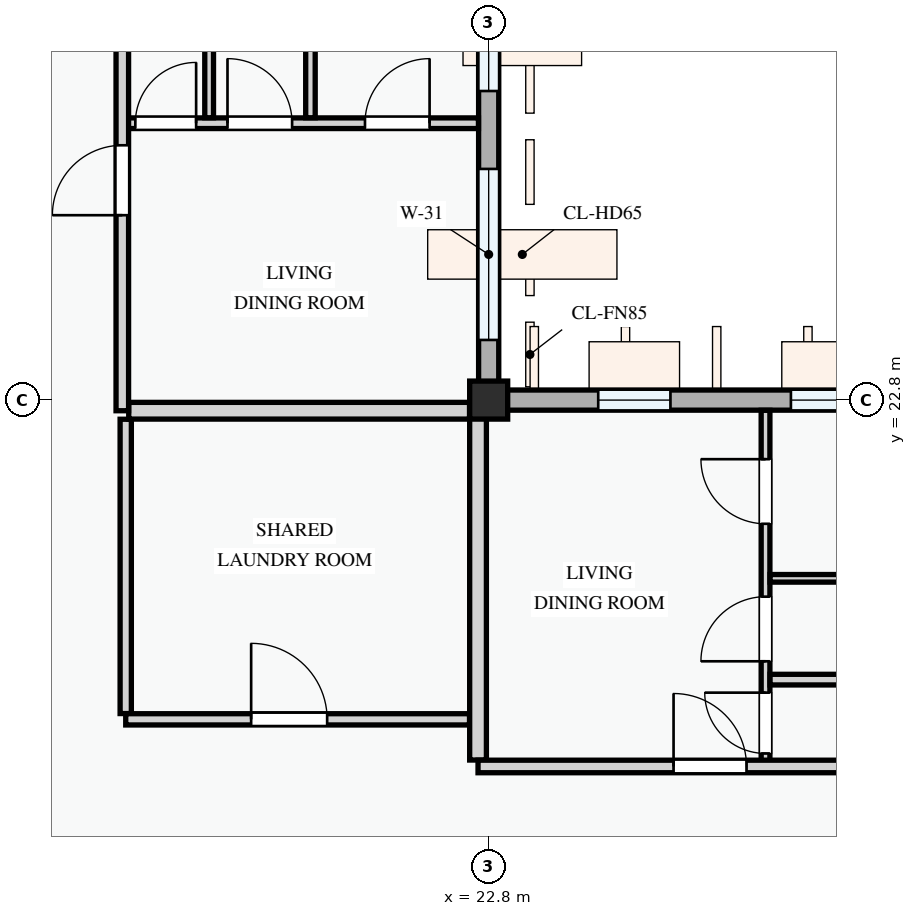
"""IFC4 building model, lengths in metres.
Left out: names, types, materials, properties, quantities, classifications, styles, units other than length and angle.
Written with IfcOpenShell. Run it as: python <this file> out.ifc"""

import sys

from ifc_helpers import new_model, si_unit, direction, frame, frame_2d, origin, origin_2d, place, context, subcontext, project, spatial, rectangle, extrude, element, fill, save


model = new_model("IFC4")
c1 = context("Model", 3, precision=1e-05, world=origin(), true_north=direction((0.0, 1.0)))
c2 = subcontext(c1, "Body", "Model", "MODEL_VIEW")
j1 = project(units=[si_unit("LENGTHUNIT", "METRE"), si_unit("PLANEANGLEUNIT", "RADIAN")], contexts=[c1])
p1 = place(None, origin())
s1 = spatial("IfcSite", under=j1, at=p1, CompositionType="ELEMENT")
p2 = place(p1, origin())
s2 = spatial("IfcBuilding", under=s1, at=p2, CompositionType="ELEMENT")
p3 = place(p2, frame((0.0, 0.0, 27.9)))
s3 = spatial("IfcBuildingStorey", under=s2, at=p3, CompositionType="ELEMENT", Elevation=27.9)
p4 = place(p3, frame((22.8, 22.8, 0.0), z_axis=(0.0, 0.0, 1.0), x_axis=(1.0, 0.0, 0.0)))
e1 = element("IfcColumn", 1, at=p4, inside=s3, PredefinedType="COLUMN", context=c2, shape_type="SweptSolid", body=[
    extrude(rectangle(XDim=0.5, YDim=0.5, at=origin_2d()), origin(), (0.0, 0.0, 1.0), 3.3),
])
p5 = place(p3, frame((22.8, 22.8, 0.0), z_axis=(0.0, 0.0, 1.0), x_axis=(0.0, 1.0, 0.0)))
e2 = element("IfcWall", 2, at=p5, inside=s3, PredefinedType="STANDARD", context=c2, shape_type="SweptSolid", body=[
    extrude(rectangle(XDim=6.0, YDim=0.265, at=frame_2d((3.0, 0.0))), origin(), (0.0, 0.0, 1.0), 2.575),
])
p6 = place(p5, frame((0.791, 0.0, 0.78)))
e3 = element("IfcOpeningElement", 3, at=p6, cuts=e2, PredefinedType="OPENING", context=c2, shape_type="SweptSolid", body=[
    extrude(rectangle(XDim=2.25, YDim=1.6, at=frame_2d((1.125, 0.8))), frame((0.0, 0.143, 0.0), z_axis=(0.0, -1.0, 0.0), x_axis=(1.0, 0.0, 0.0)), (0.0, 0.0, 1.0), 0.285),
])
p7 = place(p5, frame((4.066, 0.0, 0.78)))
e4 = element("IfcOpeningElement", 4, at=p7, cuts=e2, PredefinedType="OPENING", context=c2, shape_type="SweptSolid", body=[
    extrude(rectangle(XDim=1.32, YDim=1.35, at=frame_2d((0.66, 0.675))), frame((0.0, 0.143, 0.0), z_axis=(0.0, -1.0, 0.0), x_axis=(1.0, 0.0, 0.0)), (0.0, 0.0, 1.0), 0.285),
])
p8 = place(p3, frame((28.8, 22.8, 0.0), z_axis=(0.0, 0.0, 1.0), x_axis=(-1.0, 0.0, 0.0)))
e5 = element("IfcWall", 5, at=p8, inside=s3, PredefinedType="STANDARD", context=c2, shape_type="SweptSolid", body=[
    extrude(rectangle(XDim=6.0, YDim=0.265, at=frame_2d((3.0, 0.0))), origin(), (0.0, 0.0, 1.0), 2.475),
])
p9 = place(p8, frame((0.524, 0.0, 0.78)))
e6 = element("IfcOpeningElement", 6, at=p9, cuts=e5, PredefinedType="OPENING", context=c2, shape_type="SweptSolid", body=[
    extrude(rectangle(XDim=1.5, YDim=1.5, at=frame_2d((0.75, 0.75))), frame((0.0, 0.143, 0.0), z_axis=(0.0, -1.0, 0.0), x_axis=(1.0, 0.0, 0.0)), (0.0, 0.0, 1.0), 0.285),
])
p10 = place(p8, frame((3.609, 0.0, 0.78)))
e7 = element("IfcOpeningElement", 7, at=p10, cuts=e5, PredefinedType="OPENING", context=c2, shape_type="SweptSolid", body=[
    extrude(rectangle(XDim=0.95, YDim=1.15, at=frame_2d((0.475, 0.575))), frame((0.0, 0.143, 0.0), z_axis=(0.0, -1.0, 0.0), x_axis=(1.0, 0.0, 0.0)), (0.0, 0.0, 1.0), 0.285),
])
p11 = place(p3, frame((18.025, 18.676, 0.0), z_axis=(0.0, 0.0, 1.0), x_axis=(0.0, 1.0, 0.0)))
e8 = element("IfcWall", 8, at=p11, inside=s3, PredefinedType="PARTITIONING", context=c2, shape_type="SweptSolid", body=[
    extrude(rectangle(XDim=3.872, YDim=0.148, at=frame_2d((1.936, 0.0))), origin(), (0.0, 0.0, 1.0), 3.0),
])
p12 = place(p3, frame((18.025, 18.6, 0.0), z_axis=(0.0, 0.0, 1.0), x_axis=(1.0, 0.0, 0.0)))
e9 = element("IfcWall", 9, at=p12, inside=s3, PredefinedType="PARTITIONING", context=c2, shape_type="SweptSolid", body=[
    extrude(rectangle(XDim=4.523, YDim=0.148, at=frame_2d((2.262, 0.0))), origin(), (0.0, 0.0, 1.0), 3.0),
])
p13 = place(p12, frame((1.65, 0.0, 0.0)))
e10 = element("IfcOpeningElement", 10, at=p13, cuts=e9, PredefinedType="OPENING", context=c2, shape_type="SweptSolid", body=[
    extrude(rectangle(XDim=1.0, YDim=2.15, at=frame_2d((0.5, 1.075))), frame((0.0, 0.084, 0.0), z_axis=(0.0, -1.0, 0.0), x_axis=(1.0, 0.0, 0.0)), (0.0, 0.0, 1.0), 0.168),
])
p14 = place(p3, frame((17.98, 26.442, 0.0), z_axis=(0.0, 0.0, 1.0), x_axis=(1.0, 0.0, 0.0)))
e11 = element("IfcWall", 11, at=p14, inside=s3, PredefinedType="PARTITIONING", context=c2, shape_type="SweptSolid", body=[
    extrude(rectangle(XDim=4.686, YDim=0.14, at=frame_2d((2.343, 0.0))), origin(), (0.0, 0.0, 1.0), 3.0),
])
p15 = place(p14, frame((0.171, 0.0, 0.0)))
e12 = element("IfcOpeningElement", 12, at=p15, cuts=e11, PredefinedType="OPENING", context=c2, shape_type="SweptSolid", body=[
    extrude(rectangle(XDim=0.8, YDim=2.1, at=frame_2d((0.4, 1.05))), frame((0.0, 0.08, 0.0), z_axis=(0.0, -1.0, 0.0), x_axis=(1.0, 0.0, 0.0)), (0.0, 0.0, 1.0), 0.16),
])
p16 = place(p14, frame((1.384, 0.0, 0.0)))
e13 = element("IfcOpeningElement", 13, at=p16, cuts=e11, PredefinedType="OPENING", context=c2, shape_type="SweptSolid", body=[
    extrude(rectangle(XDim=0.85, YDim=2.1, at=frame_2d((0.425, 1.05))), frame((0.0, 0.08, 0.0), z_axis=(0.0, -1.0, 0.0), x_axis=(1.0, 0.0, 0.0)), (0.0, 0.0, 1.0), 0.16),
])
p17 = place(p14, frame((3.193, 0.0, 0.0)))
e14 = element("IfcOpeningElement", 14, at=p17, cuts=e11, PredefinedType="OPENING", context=c2, shape_type="SweptSolid", body=[
    extrude(rectangle(XDim=0.85, YDim=2.1, at=frame_2d((0.425, 1.05))), frame((0.0, 0.08, 0.0), z_axis=(0.0, -1.0, 0.0), x_axis=(1.0, 0.0, 0.0)), (0.0, 0.0, 1.0), 0.16),
])
p18 = place(p3, frame((20.455, 26.514, 0.0), z_axis=(0.0, 0.0, 1.0), x_axis=(0.0, 1.0, 0.0)))
e15 = element("IfcWall", 15, at=p18, inside=s3, PredefinedType="PARTITIONING", context=c2, shape_type="SweptSolid", body=[
    extrude(rectangle(XDim=3.924, YDim=0.125, at=frame_2d((1.962, 0.0))), origin(), (0.0, 0.0, 1.0), 3.0),
])
p19 = place(p3, frame((19.122, 26.514, 0.0), z_axis=(0.0, 0.0, 1.0), x_axis=(0.0, 1.0, 0.0)))
e16 = element("IfcWall", 16, at=p19, inside=s3, PredefinedType="PARTITIONING", context=c2, shape_type="SweptSolid", body=[
    extrude(rectangle(XDim=3.924, YDim=0.115, at=frame_2d((1.962, 0.0))), origin(), (0.0, 0.0, 1.0), 3.0),
])
p20 = place(p3, frame((18.064, 22.66, 0.0), z_axis=(0.0, 0.0, 1.0), x_axis=(1.0, 0.0, 0.0)))
e17 = element("IfcWall", 17, at=p20, inside=s3, PredefinedType="PARTITIONING", context=c2, shape_type="SweptSolid", body=[
    extrude(rectangle(XDim=4.484, YDim=0.22, at=frame_2d((2.242, 0.0))), origin(), (0.0, 0.0, 1.0), 2.375),
])
p21 = place(p3, frame((17.98, 22.66, 0.0), z_axis=(0.0, 0.0, 1.0), x_axis=(0.0, 1.0, 0.0)))
e18 = element("IfcWall", 18, at=p21, inside=s3, PredefinedType="PARTITIONING", context=c2, shape_type="SweptSolid", body=[
    extrude(rectangle(XDim=20.406, YDim=0.165, at=frame_2d((10.203, 0.0))), origin(), (0.0, 0.0, 1.0), 3.0),
])
p22 = place(p21, frame((2.573, 0.0, 0.0)))
e19 = element("IfcOpeningElement", 19, at=p22, cuts=e18, PredefinedType="OPENING", context=c2, shape_type="SweptSolid", body=[
    extrude(rectangle(XDim=0.92, YDim=2.1, at=frame_2d((0.46, 1.05))), frame((0.0, 0.093, 0.0), z_axis=(0.0, -1.0, 0.0), x_axis=(1.0, 0.0, 0.0)), (0.0, 0.0, 1.0), 0.185),
])
p23 = place(p21, frame((9.824, 0.0, 0.0)))
e20 = element("IfcOpeningElement", 20, at=p23, cuts=e18, PredefinedType="OPENING", context=c2, shape_type="SweptSolid", body=[
    extrude(rectangle(XDim=0.96, YDim=2.12, at=frame_2d((0.48, 1.06))), frame((0.0, 0.093, 0.0), z_axis=(0.0, -1.0, 0.0), x_axis=(1.0, 0.0, 0.0)), (0.0, 0.0, 1.0), 0.185),
])
p24 = place(p3, frame((26.442, 17.98, 0.0), z_axis=(0.0, 0.0, 1.0), x_axis=(0.0, 1.0, 0.0)))
e21 = element("IfcWall", 21, at=p24, inside=s3, PredefinedType="PARTITIONING", context=c2, shape_type="SweptSolid", body=[
    extrude(rectangle(XDim=4.686, YDim=0.115, at=frame_2d((2.343, 0.0))), origin(), (0.0, 0.0, 1.0), 3.0),
])
p25 = place(p24, frame((0.171, 0.0, 0.0)))
e22 = element("IfcOpeningElement", 22, at=p25, cuts=e21, PredefinedType="OPENING", context=c2, shape_type="SweptSolid", body=[
    extrude(rectangle(XDim=0.8, YDim=2.1, at=frame_2d((0.4, 1.05))), frame((0.0, 0.067, 0.0), z_axis=(0.0, -1.0, 0.0), x_axis=(1.0, 0.0, 0.0)), (0.0, 0.0, 1.0), 0.135),
])
p26 = place(p24, frame((1.384, 0.0, 0.0)))
e23 = element("IfcOpeningElement", 23, at=p26, cuts=e21, PredefinedType="OPENING", context=c2, shape_type="SweptSolid", body=[
    extrude(rectangle(XDim=0.85, YDim=2.1, at=frame_2d((0.425, 1.05))), frame((0.0, 0.067, 0.0), z_axis=(0.0, -1.0, 0.0), x_axis=(1.0, 0.0, 0.0)), (0.0, 0.0, 1.0), 0.135),
])
p27 = place(p24, frame((3.193, 0.0, 0.0)))
e24 = element("IfcOpeningElement", 24, at=p27, cuts=e21, PredefinedType="OPENING", context=c2, shape_type="SweptSolid", body=[
    extrude(rectangle(XDim=0.85, YDim=2.1, at=frame_2d((0.425, 1.05))), frame((0.0, 0.067, 0.0), z_axis=(0.0, -1.0, 0.0), x_axis=(1.0, 0.0, 0.0)), (0.0, 0.0, 1.0), 0.135),
])
p28 = place(p3, frame((26.502, 20.455, 0.0), z_axis=(0.0, 0.0, 1.0), x_axis=(1.0, 0.0, 0.0)))
e25 = element("IfcWall", 25, at=p28, inside=s3, PredefinedType="PARTITIONING", context=c2, shape_type="SweptSolid", body=[
    extrude(rectangle(XDim=3.936, YDim=0.1, at=frame_2d((1.968, 0.0))), origin(), (0.0, 0.0, 1.0), 3.0),
])
p29 = place(p3, frame((26.502, 19.122, 0.0), z_axis=(0.0, 0.0, 1.0), x_axis=(1.0, 0.0, 0.0)))
e26 = element("IfcWall", 26, at=p29, inside=s3, PredefinedType="PARTITIONING", context=c2, shape_type="SweptSolid", body=[
    extrude(rectangle(XDim=3.936, YDim=0.14, at=frame_2d((1.968, 0.0))), origin(), (0.0, 0.0, 1.0), 3.0),
])
p30 = place(p3, frame((22.66, 18.064, 0.0), z_axis=(0.0, 0.0, 1.0), x_axis=(0.0, 1.0, 0.0)))
e27 = element("IfcWall", 27, at=p30, inside=s3, PredefinedType="PARTITIONING", context=c2, shape_type="SweptSolid", body=[
    extrude(rectangle(XDim=4.676, YDim=0.22, at=frame_2d((2.338, 0.0))), origin(), (0.0, 0.0, 1.0), 2.425),
])
p31 = place(p3, frame((22.66, 17.98, 0.0), z_axis=(0.0, 0.0, 1.0), x_axis=(1.0, 0.0, 0.0)))
e28 = element("IfcWall", 28, at=p31, inside=s3, PredefinedType="PARTITIONING", context=c2, shape_type="SweptSolid", body=[
    extrude(rectangle(XDim=20.406, YDim=0.165, at=frame_2d((10.203, 0.0))), origin(), (0.0, 0.0, 1.0), 3.0),
])
p32 = place(p31, frame((2.573, 0.0, 0.0)))
e29 = element("IfcOpeningElement", 29, at=p32, cuts=e28, PredefinedType="OPENING", context=c2, shape_type="SweptSolid", body=[
    extrude(rectangle(XDim=0.96, YDim=2.12, at=frame_2d((0.48, 1.06))), frame((0.0, 0.093, 0.0), z_axis=(0.0, -1.0, 0.0), x_axis=(1.0, 0.0, 0.0)), (0.0, 0.0, 1.0), 0.185),
])
p33 = place(p31, frame((9.824, 0.0, 0.0)))
e30 = element("IfcOpeningElement", 30, at=p33, cuts=e28, PredefinedType="OPENING", context=c2, shape_type="SweptSolid", body=[
    extrude(rectangle(XDim=0.92, YDim=2.1, at=frame_2d((0.46, 1.05))), frame((0.0, 0.093, 0.0), z_axis=(0.0, -1.0, 0.0), x_axis=(1.0, 0.0, 0.0)), (0.0, 0.0, 1.0), 0.185),
])
p34 = place(p6, origin())
e31 = element("IfcWindow", 31, at=p34, inside=s3, PartitioningType="DOUBLE_PANEL_VERTICAL", PredefinedType="WINDOW", context=c2, shape_type="SweptSolid", body=[
    extrude(rectangle(XDim=2.25, YDim=1.6, at=frame_2d((1.125, 0.8))), frame((0.0, 0.03, 0.0), z_axis=(0.0, -1.0, 0.0), x_axis=(1.0, 0.0, 0.0)), (0.0, 0.0, 1.0), 0.06),
])
fill(e3, e31)
p35 = place(p7, origin())
e32 = element("IfcWindow", 32, at=p35, inside=s3, PartitioningType="SINGLE_PANEL", PredefinedType="WINDOW", context=c2, shape_type="SweptSolid", body=[
    extrude(rectangle(XDim=1.32, YDim=1.35, at=frame_2d((0.66, 0.675))), frame((0.0, 0.03, 0.0), z_axis=(0.0, -1.0, 0.0), x_axis=(1.0, 0.0, 0.0)), (0.0, 0.0, 1.0), 0.06),
])
fill(e4, e32)
p36 = place(p9, origin())
e33 = element("IfcWindow", 33, at=p36, inside=s3, PartitioningType="SINGLE_PANEL", PredefinedType="WINDOW", context=c2, shape_type="SweptSolid", body=[
    extrude(rectangle(XDim=1.5, YDim=1.5, at=frame_2d((0.75, 0.75))), frame((0.0, 0.03, 0.0), z_axis=(0.0, -1.0, 0.0), x_axis=(1.0, 0.0, 0.0)), (0.0, 0.0, 1.0), 0.06),
])
fill(e6, e33)
p37 = place(p10, origin())
e34 = element("IfcWindow", 34, at=p37, inside=s3, PartitioningType="SINGLE_PANEL", PredefinedType="WINDOW", context=c2, shape_type="SweptSolid", body=[
    extrude(rectangle(XDim=0.95, YDim=1.15, at=frame_2d((0.475, 0.575))), frame((0.0, 0.03, 0.0), z_axis=(0.0, -1.0, 0.0), x_axis=(1.0, 0.0, 0.0)), (0.0, 0.0, 1.0), 0.06),
])
fill(e7, e34)
p38 = place(p13, origin())
e35 = element("IfcDoor", 35, at=p38, inside=s3, OperationType="SINGLE_SWING_LEFT", PredefinedType="DOOR", context=c2, shape_type="SweptSolid", body=[
    extrude(rectangle(XDim=1.0, YDim=2.15, at=frame_2d((0.5, 1.075))), frame((0.0, 0.025, 0.0), z_axis=(0.0, -1.0, 0.0), x_axis=(1.0, 0.0, 0.0)), (0.0, 0.0, 1.0), 0.05),
])
fill(e10, e35)
p39 = place(p15, origin())
e36 = element("IfcDoor", 36, at=p39, inside=s3, OperationType="SINGLE_SWING_RIGHT", PredefinedType="DOOR", context=c2, shape_type="SweptSolid", body=[
    extrude(rectangle(XDim=0.8, YDim=2.1, at=frame_2d((0.4, 1.05))), frame((0.0, 0.025, 0.0), z_axis=(0.0, -1.0, 0.0), x_axis=(1.0, 0.0, 0.0)), (0.0, 0.0, 1.0), 0.05),
])
fill(e12, e36)
p40 = place(p16, origin())
e37 = element("IfcDoor", 37, at=p40, inside=s3, OperationType="SINGLE_SWING_LEFT", PredefinedType="DOOR", context=c2, shape_type="SweptSolid", body=[
    extrude(rectangle(XDim=0.85, YDim=2.1, at=frame_2d((0.425, 1.05))), frame((0.0, 0.025, 0.0), z_axis=(0.0, -1.0, 0.0), x_axis=(1.0, 0.0, 0.0)), (0.0, 0.0, 1.0), 0.05),
])
fill(e13, e37)
p41 = place(p17, origin())
e38 = element("IfcDoor", 38, at=p41, inside=s3, OperationType="SINGLE_SWING_RIGHT", PredefinedType="DOOR", context=c2, shape_type="SweptSolid", body=[
    extrude(rectangle(XDim=0.85, YDim=2.1, at=frame_2d((0.425, 1.05))), frame((0.0, 0.025, 0.0), z_axis=(0.0, -1.0, 0.0), x_axis=(1.0, 0.0, 0.0)), (0.0, 0.0, 1.0), 0.05),
])
fill(e14, e38)
p42 = place(p22, origin())
e39 = element("IfcDoor", 39, at=p42, inside=s3, OperationType="SINGLE_SWING_LEFT", PredefinedType="DOOR", context=c2, shape_type="SweptSolid", body=[
    extrude(rectangle(XDim=0.92, YDim=2.1, at=frame_2d((0.46, 1.05))), frame((0.0, 0.025, 0.0), z_axis=(0.0, -1.0, 0.0), x_axis=(1.0, 0.0, 0.0)), (0.0, 0.0, 1.0), 0.05),
])
fill(e19, e39)
p43 = place(p25, origin())
e40 = element("IfcDoor", 40, at=p43, inside=s3, OperationType="SINGLE_SWING_RIGHT", PredefinedType="DOOR", context=c2, shape_type="SweptSolid", body=[
    extrude(rectangle(XDim=0.8, YDim=2.1, at=frame_2d((0.4, 1.05))), frame((0.0, 0.025, 0.0), z_axis=(0.0, -1.0, 0.0), x_axis=(1.0, 0.0, 0.0)), (0.0, 0.0, 1.0), 0.05),
])
fill(e22, e40)
p44 = place(p26, origin())
e41 = element("IfcDoor", 41, at=p44, inside=s3, OperationType="SINGLE_SWING_LEFT", PredefinedType="DOOR", context=c2, shape_type="SweptSolid", body=[
    extrude(rectangle(XDim=0.85, YDim=2.1, at=frame_2d((0.425, 1.05))), frame((0.0, 0.025, 0.0), z_axis=(0.0, -1.0, 0.0), x_axis=(1.0, 0.0, 0.0)), (0.0, 0.0, 1.0), 0.05),
])
fill(e23, e41)
p45 = place(p27, origin())
e42 = element("IfcDoor", 42, at=p45, inside=s3, OperationType="SINGLE_SWING_RIGHT", PredefinedType="DOOR", context=c2, shape_type="SweptSolid", body=[
    extrude(rectangle(XDim=0.85, YDim=2.1, at=frame_2d((0.425, 1.05))), frame((0.0, 0.025, 0.0), z_axis=(0.0, -1.0, 0.0), x_axis=(1.0, 0.0, 0.0)), (0.0, 0.0, 1.0), 0.05),
])
fill(e24, e42)
p46 = place(p32, origin())
e43 = element("IfcDoor", 43, at=p46, inside=s3, OperationType="SINGLE_SWING_LEFT", PredefinedType="DOOR", context=c2, shape_type="SweptSolid", body=[
    extrude(rectangle(XDim=0.96, YDim=2.12, at=frame_2d((0.48, 1.06))), frame((0.0, 0.025, 0.0), z_axis=(0.0, -1.0, 0.0), x_axis=(1.0, 0.0, 0.0)), (0.0, 0.0, 1.0), 0.05),
])
fill(e29, e43)
save(model, sys.argv[1])
